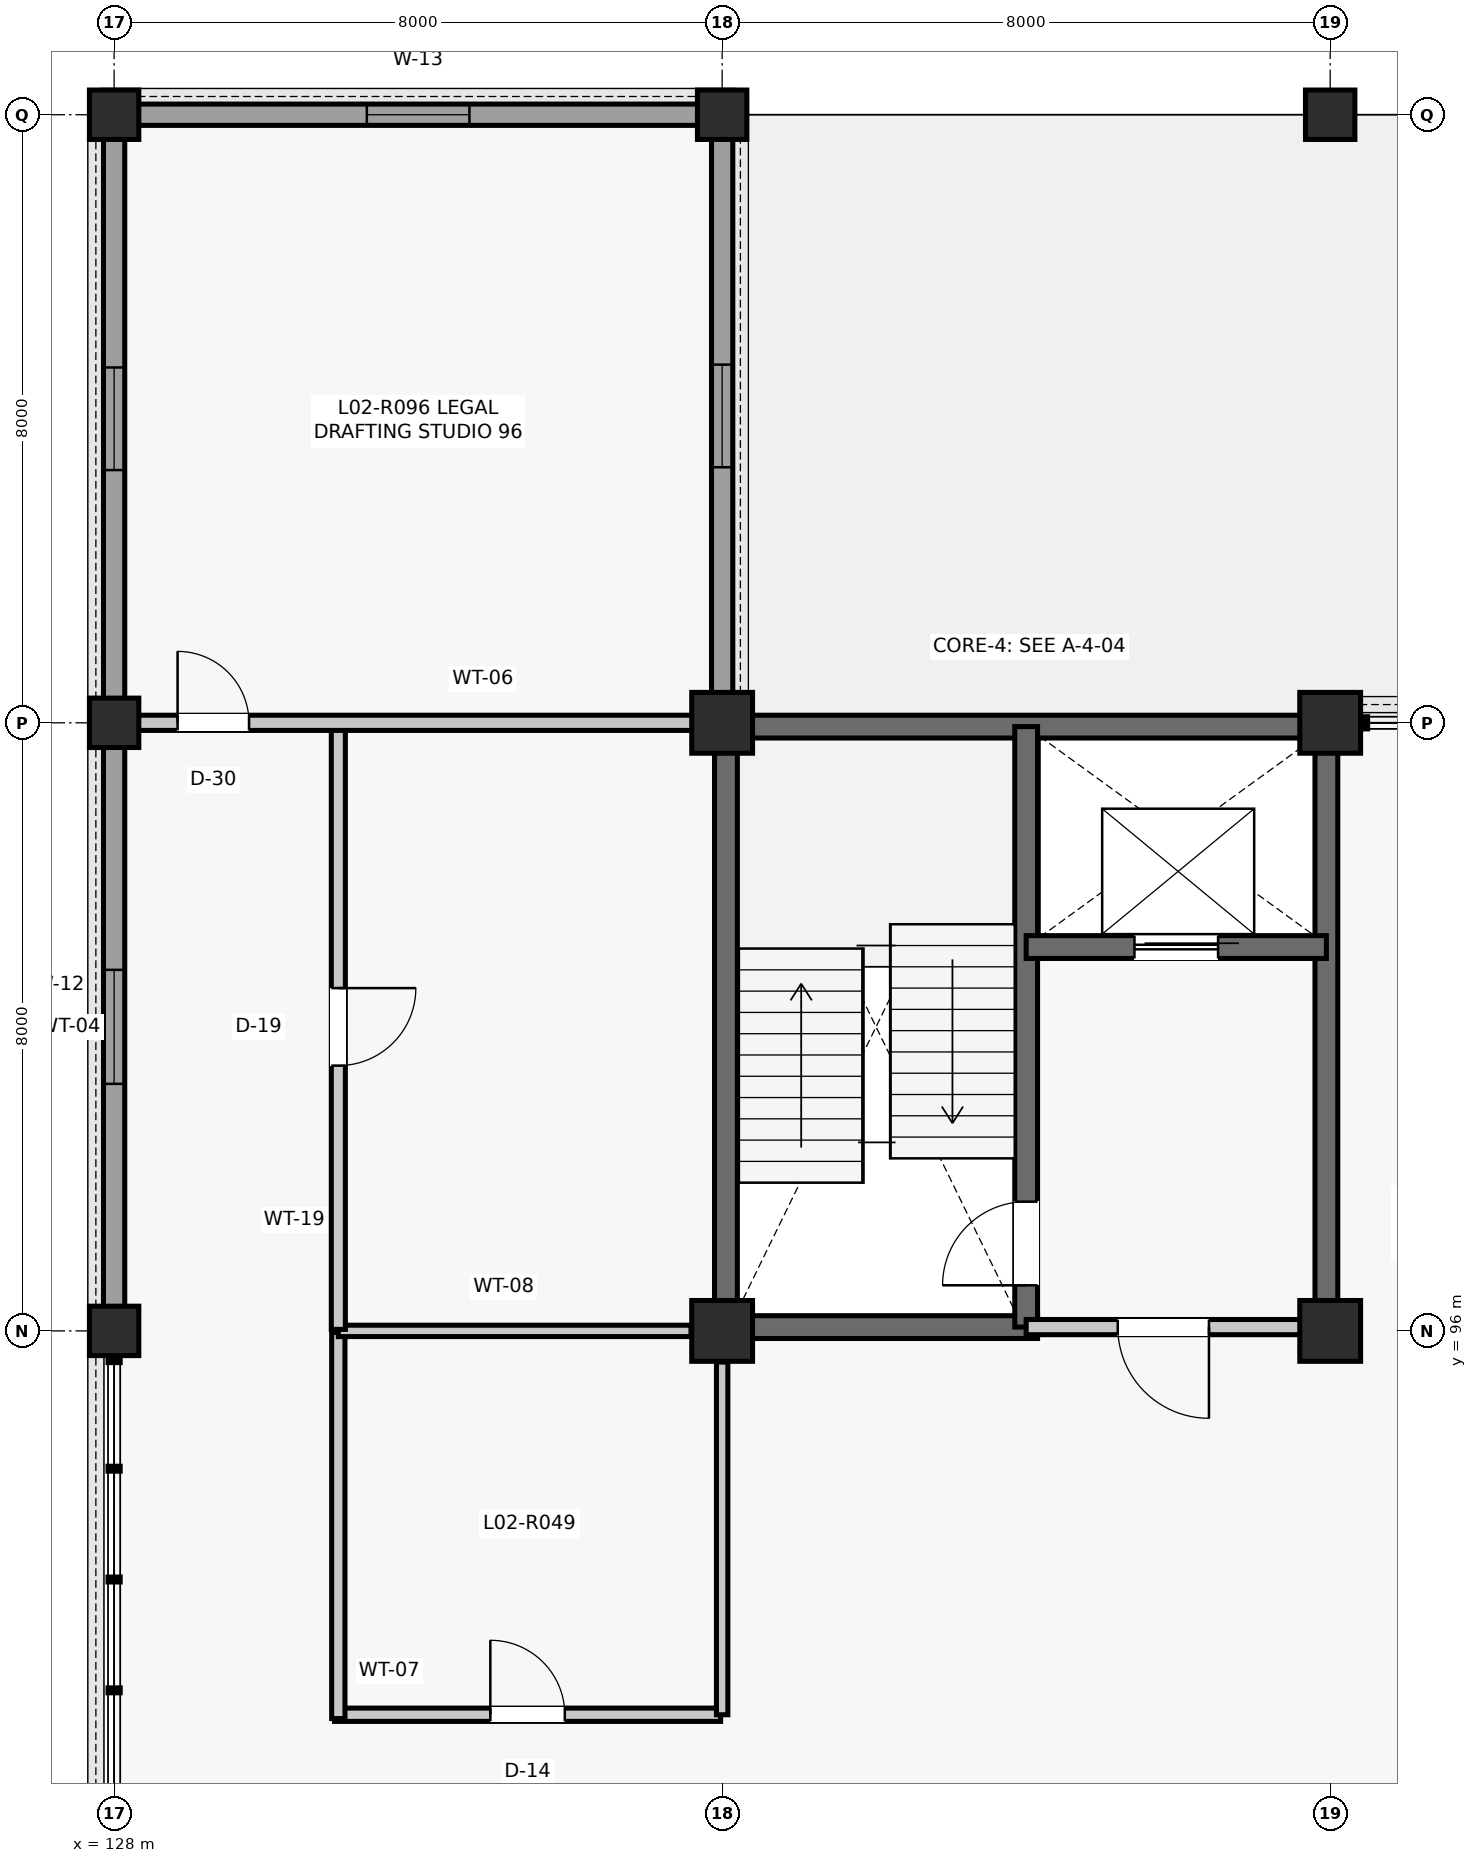
"""IFC4 building model, lengths in metres.
Left out: names, types, materials, properties, quantities, classifications, styles, units other than length and angle.
Written with IfcOpenShell. Run it as: python <this file> out.ifc"""

import sys

from ifc_helpers import new_model, si_unit, direction, frame, frame_2d, origin, origin_2d, place, context, subcontext, project, spatial, rectangle, extrude, element, fill, save


model = new_model("IFC4")
c1 = context("Model", 3, precision=1e-05, world=origin(), true_north=direction((0.0, 1.0)))
c2 = subcontext(c1, "Body", "Model", "MODEL_VIEW")
j1 = project(units=[si_unit("LENGTHUNIT", "METRE"), si_unit("PLANEANGLEUNIT", "RADIAN")], contexts=[c1])
p1 = place(None, origin())
s1 = spatial("IfcSite", under=j1, at=p1, CompositionType="ELEMENT")
p2 = place(p1, origin())
s2 = spatial("IfcBuilding", under=s1, at=p2, CompositionType="ELEMENT")
p3 = place(p2, frame((0.0, 0.0, 9.9)))
s3 = spatial("IfcBuildingStorey", under=s2, at=p3, CompositionType="ELEMENT", Elevation=9.9)
for number, where, z_axis, x_axis in (
    (1, (128.0, 96.0, 0.0), (0.0, 0.0, 1.0), (1.0, 0.0, 0.0)),
    (2, (128.0, 104.0, 0.0), (0.0, 0.0, 1.0), (1.0, 0.0, 0.0)),
    (3, (128.0, 112.0, 0.0), (0.0, 0.0, 1.0), (1.0, 0.0, 0.0)),
):
    element("IfcColumn", number, at=place(p3, frame(where, z_axis=z_axis, x_axis=x_axis)), inside=s3, PredefinedType="COLUMN", context=c2, shape_type="SweptSolid", body=[
        extrude(rectangle(XDim=0.65, YDim=0.65, at=origin_2d()), origin(), (0.0, 0.0, 1.0), 3.96),
    ])
for number, where, z_axis, x_axis in (
    (4, (136.0, 96.0, 0.0), (0.0, 0.0, 1.0), (1.0, 0.0, 0.0)),
    (5, (136.0, 104.0, 0.0), (0.0, 0.0, 1.0), (1.0, 0.0, 0.0)),
):
    element("IfcColumn", number, at=place(p3, frame(where, z_axis=z_axis, x_axis=x_axis)), inside=s3, PredefinedType="COLUMN", context=c2, shape_type="SweptSolid", body=[
        extrude(rectangle(XDim=0.8, YDim=0.8, at=origin_2d()), origin(), (0.0, 0.0, 1.0), 3.96),
    ])
p4 = place(p3, frame((136.0, 112.0, 0.0), z_axis=(0.0, 0.0, 1.0), x_axis=(1.0, 0.0, 0.0)))
e6 = element("IfcColumn", 6, at=p4, inside=s3, PredefinedType="COLUMN", context=c2, shape_type="SweptSolid", body=[
    extrude(rectangle(XDim=0.65, YDim=0.65, at=origin_2d()), origin(), (0.0, 0.0, 1.0), 3.96),
])
for number, where, z_axis, x_axis in (
    (7, (144.0, 96.0, 0.0), (0.0, 0.0, 1.0), (1.0, 0.0, 0.0)),
    (8, (144.0, 104.0, 0.0), (0.0, 0.0, 1.0), (1.0, 0.0, 0.0)),
):
    element("IfcColumn", number, at=place(p3, frame(where, z_axis=z_axis, x_axis=x_axis)), inside=s3, PredefinedType="COLUMN", context=c2, shape_type="SweptSolid", body=[
        extrude(rectangle(XDim=0.8, YDim=0.8, at=origin_2d()), origin(), (0.0, 0.0, 1.0), 3.96),
    ])
p5 = place(p3, frame((144.0, 112.0, 0.0), z_axis=(0.0, 0.0, 1.0), x_axis=(1.0, 0.0, 0.0)))
e9 = element("IfcColumn", 9, at=p5, inside=s3, PredefinedType="COLUMN", context=c2, shape_type="SweptSolid", body=[
    extrude(rectangle(XDim=0.65, YDim=0.65, at=origin_2d()), origin(), (0.0, 0.0, 1.0), 3.96),
])
p6 = place(p3, frame((128.0, 96.31, 0.0), z_axis=(0.0, 0.0, 1.0), x_axis=(0.0, 1.0, 0.0)))
e10 = element("IfcWall", 10, at=p6, inside=s3, PredefinedType="SOLIDWALL", context=c2, shape_type="SweptSolid", body=[
    extrude(rectangle(XDim=7.38, YDim=0.28, at=frame_2d((3.69, 0.0))), origin(), (0.0, 0.0, 1.0), 3.284),
])
p7 = place(p6, frame((2.94, 0.0, 0.9)))
e11 = element("IfcOpeningElement", 11, at=p7, cuts=e10, PredefinedType="OPENING", context=c2, shape_type="SweptSolid", body=[
    extrude(rectangle(XDim=1.5, YDim=1.9, at=frame_2d((0.75, 0.95))), frame((0.0, 0.15, 0.0), z_axis=(0.0, -1.0, 0.0), x_axis=(1.0, 0.0, 0.0)), (0.0, 0.0, 1.0), 0.3),
])
p8 = place(p3, frame((128.31, 112.0, 0.0), z_axis=(0.0, 0.0, 1.0), x_axis=(1.0, 0.0, 0.0)))
e12 = element("IfcWall", 12, at=p8, inside=s3, PredefinedType="SOLIDWALL", context=c2, shape_type="SweptSolid", body=[
    extrude(rectangle(XDim=7.38, YDim=0.28, at=frame_2d((3.69, 0.0))), origin(), (0.0, 0.0, 1.0), 3.28),
])
p9 = place(p8, frame((3.015, 0.0, 0.9)))
e13 = element("IfcOpeningElement", 13, at=p9, cuts=e12, PredefinedType="OPENING", context=c2, shape_type="SweptSolid", body=[
    extrude(rectangle(XDim=1.35, YDim=1.9, at=frame_2d((0.675, 0.95))), frame((0.0, 0.15, 0.0), z_axis=(0.0, -1.0, 0.0), x_axis=(1.0, 0.0, 0.0)), (0.0, 0.0, 1.0), 0.3),
])
p10 = place(p3, frame((128.0, 104.31, 0.0), z_axis=(0.0, 0.0, 1.0), x_axis=(0.0, 1.0, 0.0)))
e14 = element("IfcWall", 14, at=p10, inside=s3, PredefinedType="SOLIDWALL", context=c2, shape_type="SweptSolid", body=[
    extrude(rectangle(XDim=7.38, YDim=0.28, at=frame_2d((3.69, 0.0))), origin(), (0.0, 0.0, 1.0), 3.347),
])
p11 = place(p10, frame((3.015, 0.0, 0.9)))
e15 = element("IfcOpeningElement", 15, at=p11, cuts=e14, PredefinedType="OPENING", context=c2, shape_type="SweptSolid", body=[
    extrude(rectangle(XDim=1.35, YDim=1.9, at=frame_2d((0.675, 0.95))), frame((0.0, 0.15, 0.0), z_axis=(0.0, -1.0, 0.0), x_axis=(1.0, 0.0, 0.0)), (0.0, 0.0, 1.0), 0.3),
])
p12 = place(p3, frame((136.0, 104.385, 0.0), z_axis=(0.0, 0.0, 1.0), x_axis=(0.0, 1.0, 0.0)))
e16 = element("IfcWall", 16, at=p12, inside=s3, PredefinedType="SOLIDWALL", context=c2, shape_type="SweptSolid", body=[
    extrude(rectangle(XDim=7.305, YDim=0.28, at=frame_2d((3.652, 0.0))), origin(), (0.0, 0.0, 1.0), 3.28),
])
p13 = place(p12, frame((2.978, 0.0, 0.9)))
e17 = element("IfcOpeningElement", 17, at=p13, cuts=e16, PredefinedType="OPENING", context=c2, shape_type="SweptSolid", body=[
    extrude(rectangle(XDim=1.35, YDim=1.9, at=frame_2d((0.675, 0.95))), frame((0.0, 0.15, 0.0), z_axis=(0.0, -1.0, 0.0), x_axis=(1.0, 0.0, 0.0)), (0.0, 0.0, 1.0), 0.3),
])
for number, where, z_axis, x_axis in (
    (18, (136.05, 96.29, 0.0), (0.0, 0.0, 1.0), (0.0, 1.0, 0.0)),
    (19, (136.29, 103.95, 0.0), (0.0, 0.0, 1.0), (1.0, 0.0, 0.0)),
    (20, (143.95, 96.29, 0.0), (0.0, 0.0, 1.0), (0.0, 1.0, 0.0)),
):
    element("IfcWall", number, at=place(p3, frame(where, z_axis=z_axis, x_axis=x_axis)), inside=s3, PredefinedType="SHEAR", context=c2, shape_type="SweptSolid", body=[
        extrude(rectangle(XDim=7.42, YDim=0.3, at=frame_2d((3.71, 0.0))), origin(), (0.0, 0.0, 1.0), 3.705),
    ])
p14 = place(p3, frame((136.29, 96.05, 0.0), z_axis=(0.0, 0.0, 1.0), x_axis=(1.0, 0.0, 0.0)))
e21 = element("IfcWall", 21, at=p14, inside=s3, PredefinedType="SHEAR", context=c2, shape_type="SweptSolid", body=[
    extrude(rectangle(XDim=3.86, YDim=0.3, at=frame_2d((1.93, 0.0))), origin(), (0.0, 0.0, 1.0), 3.705),
])
p15 = place(p3, frame((140.0, 96.05, 0.0), z_axis=(0.0, 0.0, 1.0), x_axis=(0.0, 1.0, 0.0)))
e22 = element("IfcWall", 22, at=p15, inside=s3, PredefinedType="SHEAR", context=c2, shape_type="SweptSolid", body=[
    extrude(rectangle(XDim=7.9, YDim=0.3, at=frame_2d((3.95, 0.0))), origin(), (0.0, 0.0, 1.0), 3.705),
])
p16 = place(p15, frame((0.55, 0.0, 0.0)))
e23 = element("IfcOpeningElement", 23, at=p16, cuts=e22, PredefinedType="OPENING", context=c2, shape_type="SweptSolid", body=[
    extrude(rectangle(XDim=1.1, YDim=2.15, at=frame_2d((0.55, 1.075))), frame((0.0, 0.16, 0.0), z_axis=(0.0, -1.0, 0.0), x_axis=(1.0, 0.0, 0.0)), (0.0, 0.0, 1.0), 0.32),
])
p17 = place(p3, frame((140.0, 101.05, 0.0), z_axis=(0.0, 0.0, 1.0), x_axis=(1.0, 0.0, 0.0)))
e24 = element("IfcWall", 24, at=p17, inside=s3, PredefinedType="SHEAR", context=c2, shape_type="SweptSolid", body=[
    extrude(rectangle(XDim=3.95, YDim=0.3, at=frame_2d((1.975, 0.0))), origin(), (0.0, 0.0, 1.0), 3.705),
])
p18 = place(p17, frame((1.425, 0.0, 0.0)))
e25 = element("IfcOpeningElement", 25, at=p18, cuts=e24, PredefinedType="OPENING", context=c2, shape_type="SweptSolid", body=[
    extrude(rectangle(XDim=1.1, YDim=2.2, at=frame_2d((0.55, 1.1))), frame((0.0, 0.16, 0.0), z_axis=(0.0, -1.0, 0.0), x_axis=(1.0, 0.0, 0.0)), (0.0, 0.0, 1.0), 0.32),
])
p19 = place(p3, frame((140.0, 96.05, 0.0), z_axis=(0.0, 0.0, 1.0), x_axis=(1.0, 0.0, 0.0)))
e26 = element("IfcWall", 26, at=p19, inside=s3, PredefinedType="PARTITIONING", context=c2, shape_type="SweptSolid", body=[
    extrude(rectangle(XDim=3.61, YDim=0.2, at=frame_2d((1.805, 0.0))), origin(), (0.0, 0.0, 1.0), 3.157),
])
p20 = place(p19, frame((1.205, 0.0, 0.0)))
e27 = element("IfcOpeningElement", 27, at=p20, cuts=e26, PredefinedType="OPENING", context=c2, shape_type="SweptSolid", body=[
    extrude(rectangle(XDim=1.2, YDim=2.15, at=frame_2d((0.6, 1.075))), frame((0.0, 0.11, 0.0), z_axis=(0.0, -1.0, 0.0), x_axis=(1.0, 0.0, 0.0)), (0.0, 0.0, 1.0), 0.22),
])
p21 = place(p3, frame((130.9, 90.95, 0.0), z_axis=(0.0, 0.0, 1.0), x_axis=(1.0, 0.0, 0.0)))
e28 = element("IfcWall", 28, at=p21, inside=s3, PredefinedType="PARTITIONING", context=c2, shape_type="SweptSolid", body=[
    extrude(rectangle(XDim=5.08, YDim=0.175, at=frame_2d((2.54, 0.0))), origin(), (0.0, 0.0, 1.0), 3.157),
])
p22 = place(p21, frame((2.05, 0.0, 0.0)))
e29 = element("IfcOpeningElement", 29, at=p22, cuts=e28, PredefinedType="OPENING", context=c2, shape_type="SweptSolid", body=[
    extrude(rectangle(XDim=0.98, YDim=2.15, at=frame_2d((0.49, 1.075))), frame((0.0, 0.097, 0.0), z_axis=(0.0, -1.0, 0.0), x_axis=(1.0, 0.0, 0.0)), (0.0, 0.0, 1.0), 0.195),
])
p23 = place(p3, frame((130.95, 90.9, 0.0), z_axis=(0.0, 0.0, 1.0), x_axis=(0.0, 1.0, 0.0)))
e30 = element("IfcWall", 30, at=p23, inside=s3, PredefinedType="PARTITIONING", context=c2, shape_type="SweptSolid", body=[
    extrude(rectangle(XDim=5.08, YDim=0.175, at=frame_2d((2.54, 0.0))), origin(), (0.0, 0.0, 1.0), 3.082),
])
p24 = place(p3, frame((130.95, 96.0, 0.0), z_axis=(0.0, 0.0, 1.0), x_axis=(1.0, 0.0, 0.0)))
e31 = element("IfcWall", 31, at=p24, inside=s3, PredefinedType="PARTITIONING", context=c2, shape_type="SweptSolid", body=[
    extrude(rectangle(XDim=4.64, YDim=0.15, at=frame_2d((2.32, 0.0))), origin(), (0.0, 0.0, 1.0), 3.082),
])
p25 = place(p3, frame((136.0, 90.95, 0.0), z_axis=(0.0, 0.0, 1.0), x_axis=(0.0, 1.0, 0.0)))
e32 = element("IfcWall", 32, at=p25, inside=s3, PredefinedType="PARTITIONING", context=c2, shape_type="SweptSolid", body=[
    extrude(rectangle(XDim=4.64, YDim=0.15, at=frame_2d((2.32, 0.0))), origin(), (0.0, 0.0, 1.0), 3.157),
])
p26 = place(p3, frame((130.95, 96.02, 0.0), z_axis=(0.0, 0.0, 1.0), x_axis=(0.0, 1.0, 0.0)))
e33 = element("IfcWall", 33, at=p26, inside=s3, PredefinedType="PARTITIONING", context=c2, shape_type="SweptSolid", body=[
    extrude(rectangle(XDim=7.96, YDim=0.185, at=frame_2d((3.98, 0.0))), origin(), (0.0, 0.0, 1.0), 3.082),
])
p27 = place(p26, frame((3.47, 0.0, 0.0)))
e34 = element("IfcOpeningElement", 34, at=p27, cuts=e33, PredefinedType="OPENING", context=c2, shape_type="SweptSolid", body=[
    extrude(rectangle(XDim=1.02, YDim=2.2, at=frame_2d((0.51, 1.1))), frame((0.0, 0.103, 0.0), z_axis=(0.0, -1.0, 0.0), x_axis=(1.0, 0.0, 0.0)), (0.0, 0.0, 1.0), 0.205),
])
p28 = place(p3, frame((128.315, 104.0, 0.0), z_axis=(0.0, 0.0, 1.0), x_axis=(1.0, 0.0, 0.0)))
e35 = element("IfcWall", 35, at=p28, inside=s3, PredefinedType="PARTITIONING", context=c2, shape_type="SweptSolid", body=[
    extrude(rectangle(XDim=7.295, YDim=0.2, at=frame_2d((3.647, 0.0))), origin(), (0.0, 0.0, 1.0), 3.157),
])
p29 = place(p28, frame((0.52, 0.0, 0.0)))
e36 = element("IfcOpeningElement", 36, at=p29, cuts=e35, PredefinedType="OPENING", context=c2, shape_type="SweptSolid", body=[
    extrude(rectangle(XDim=0.94, YDim=2.12, at=frame_2d((0.47, 1.06))), frame((0.0, 0.11, 0.0), z_axis=(0.0, -1.0, 0.0), x_axis=(1.0, 0.0, 0.0)), (0.0, 0.0, 1.0), 0.22),
])
p30 = place(p7, origin())
e37 = element("IfcWindow", 37, at=p30, inside=s3, PartitioningType="SINGLE_PANEL", PredefinedType="WINDOW", context=c2, shape_type="SweptSolid", body=[
    extrude(rectangle(XDim=1.5, YDim=1.9, at=frame_2d((0.75, 0.95))), frame((0.0, 0.03, 0.0), z_axis=(0.0, -1.0, 0.0), x_axis=(1.0, 0.0, 0.0)), (0.0, 0.0, 1.0), 0.06),
])
fill(e11, e37)
p31 = place(p9, origin())
e38 = element("IfcWindow", 38, at=p31, inside=s3, PartitioningType="SINGLE_PANEL", PredefinedType="WINDOW", context=c2, shape_type="SweptSolid", body=[
    extrude(rectangle(XDim=1.35, YDim=1.9, at=frame_2d((0.675, 0.95))), frame((0.0, 0.03, 0.0), z_axis=(0.0, -1.0, 0.0), x_axis=(1.0, 0.0, 0.0)), (0.0, 0.0, 1.0), 0.06),
])
fill(e13, e38)
p32 = place(p11, origin())
e39 = element("IfcWindow", 39, at=p32, inside=s3, PartitioningType="SINGLE_PANEL", PredefinedType="WINDOW", context=c2, shape_type="SweptSolid", body=[
    extrude(rectangle(XDim=1.35, YDim=1.9, at=frame_2d((0.675, 0.95))), frame((0.0, 0.03, 0.0), z_axis=(0.0, -1.0, 0.0), x_axis=(1.0, 0.0, 0.0)), (0.0, 0.0, 1.0), 0.06),
])
fill(e15, e39)
p33 = place(p13, origin())
e40 = element("IfcWindow", 40, at=p33, inside=s3, PartitioningType="SINGLE_PANEL", PredefinedType="WINDOW", context=c2, shape_type="SweptSolid", body=[
    extrude(rectangle(XDim=1.35, YDim=1.9, at=frame_2d((0.675, 0.95))), frame((0.0, 0.03, 0.0), z_axis=(0.0, -1.0, 0.0), x_axis=(1.0, 0.0, 0.0)), (0.0, 0.0, 1.0), 0.06),
])
fill(e17, e40)
p34 = place(p16, origin())
e41 = element("IfcDoor", 41, at=p34, inside=s3, OperationType="SINGLE_SWING_LEFT", PredefinedType="DOOR", context=c2, shape_type="SweptSolid", body=[
    extrude(rectangle(XDim=1.1, YDim=2.15, at=frame_2d((0.55, 1.075))), frame((0.0, 0.025, 0.0), z_axis=(0.0, -1.0, 0.0), x_axis=(1.0, 0.0, 0.0)), (0.0, 0.0, 1.0), 0.05),
])
fill(e23, e41)
p35 = place(p18, origin())
e42 = element("IfcDoor", 42, at=p35, inside=s3, OperationType="SLIDING_TO_LEFT", PredefinedType="DOOR", context=c2, shape_type="SweptSolid", body=[
    extrude(rectangle(XDim=1.1, YDim=2.2, at=frame_2d((0.55, 1.1))), frame((0.0, 0.025, 0.0), z_axis=(0.0, -1.0, 0.0), x_axis=(1.0, 0.0, 0.0)), (0.0, 0.0, 1.0), 0.05),
])
fill(e25, e42)
p36 = place(p20, frame((1.2, 0.0, 0.0), z_axis=(0.0, 0.0, 1.0), x_axis=(-1.0, 0.0, 0.0)))
e43 = element("IfcDoor", 43, at=p36, inside=s3, OperationType="SINGLE_SWING_RIGHT", PredefinedType="DOOR", context=c2, shape_type="SweptSolid", body=[
    extrude(rectangle(XDim=1.2, YDim=2.15, at=frame_2d((0.6, 1.075))), frame((0.0, 0.025, 0.0), z_axis=(0.0, -1.0, 0.0), x_axis=(1.0, 0.0, 0.0)), (0.0, 0.0, 1.0), 0.05),
])
fill(e27, e43)
p37 = place(p22, origin())
e44 = element("IfcDoor", 44, at=p37, inside=s3, OperationType="SINGLE_SWING_LEFT", PredefinedType="DOOR", context=c2, shape_type="SweptSolid", body=[
    extrude(rectangle(XDim=0.98, YDim=2.15, at=frame_2d((0.49, 1.075))), frame((0.0, 0.025, 0.0), z_axis=(0.0, -1.0, 0.0), x_axis=(1.0, 0.0, 0.0)), (0.0, 0.0, 1.0), 0.05),
])
fill(e29, e44)
p38 = place(p27, frame((1.02, 0.0, 0.0), z_axis=(0.0, 0.0, 1.0), x_axis=(-1.0, 0.0, 0.0)))
e45 = element("IfcDoor", 45, at=p38, inside=s3, OperationType="SINGLE_SWING_RIGHT", PredefinedType="DOOR", context=c2, shape_type="SweptSolid", body=[
    extrude(rectangle(XDim=1.02, YDim=2.2, at=frame_2d((0.51, 1.1))), frame((0.0, 0.025, 0.0), z_axis=(0.0, -1.0, 0.0), x_axis=(1.0, 0.0, 0.0)), (0.0, 0.0, 1.0), 0.05),
])
fill(e34, e45)
p39 = place(p29, origin())
e46 = element("IfcDoor", 46, at=p39, inside=s3, OperationType="SINGLE_SWING_LEFT", PredefinedType="DOOR", context=c2, shape_type="SweptSolid", body=[
    extrude(rectangle(XDim=0.94, YDim=2.12, at=frame_2d((0.47, 1.06))), frame((0.0, 0.025, 0.0), z_axis=(0.0, -1.0, 0.0), x_axis=(1.0, 0.0, 0.0)), (0.0, 0.0, 1.0), 0.05),
])
fill(e36, e46)
save(model, sys.argv[1])
